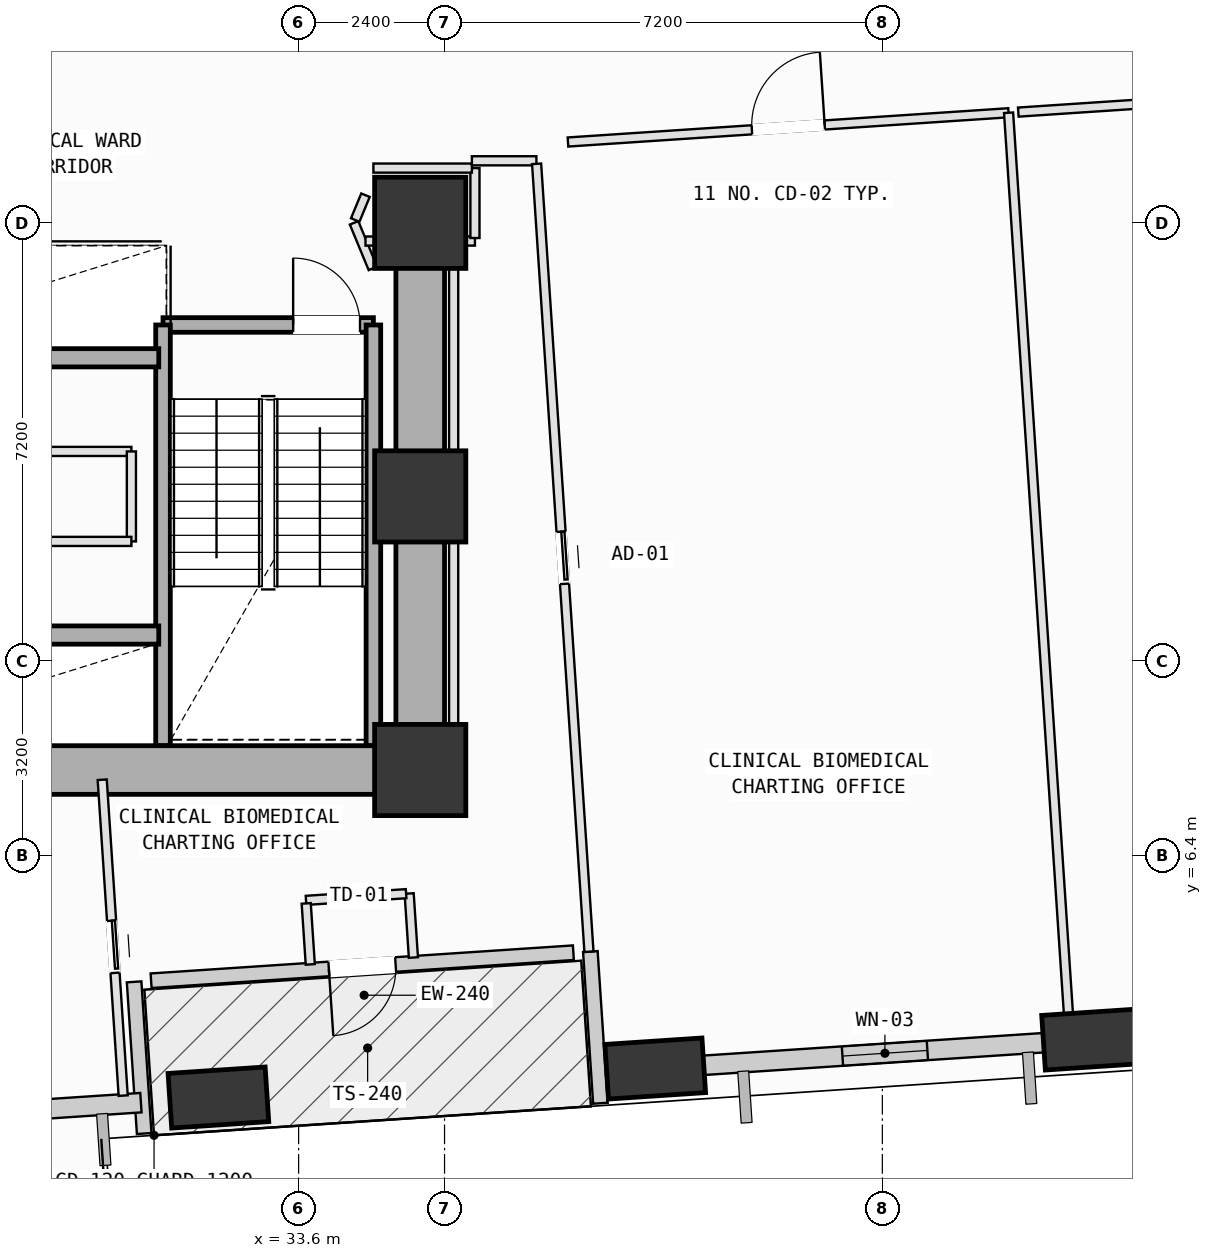
"""IFC4 building model, lengths in metres.
Left out: names, types, materials, properties, quantities, classifications, styles, units other than length and angle.
Written with IfcOpenShell. Run it as: python <this file> out.ifc"""

import sys

from ifc_helpers import new_model, si_unit, direction, frame, frame_2d, origin, origin_2d, place, context, subcontext, project, spatial, rectangle, extrude, element, fill, save


model = new_model("IFC4")
c1 = context("Model", 3, precision=1e-05, world=origin(), true_north=direction((0.0, 1.0)))
c2 = subcontext(c1, "Body", "Model", "MODEL_VIEW")
j1 = project(units=[si_unit("LENGTHUNIT", "METRE"), si_unit("PLANEANGLEUNIT", "RADIAN")], contexts=[c1])
p1 = place(None, origin())
s1 = spatial("IfcSite", under=j1, at=p1, CompositionType="ELEMENT")
p2 = place(p1, origin())
s2 = spatial("IfcBuilding", under=s1, at=p2, CompositionType="ELEMENT")
p3 = place(p2, frame((0.0, 0.0, 39.0)))
s3 = spatial("IfcBuildingStorey", under=s2, at=p3, CompositionType="ELEMENT", Elevation=39.0)
for number, where, z_axis, x_axis in (
    (1, (35.6, 7.8, 0.0), (0.0, 0.0, 1.0), (1.0, 0.0, 0.0)),
    (2, (35.6, 12.3, 0.0), (0.0, 0.0, 1.0), (1.0, 0.0, 0.0)),
    (3, (35.6, 16.8, 0.0), (0.0, 0.0, 1.0), (1.0, 0.0, 0.0)),
):
    element("IfcColumn", number, at=place(p3, frame(where, z_axis=z_axis, x_axis=x_axis)), inside=s3, PredefinedType="COLUMN", context=c2, shape_type="SweptSolid", body=[
        extrude(rectangle(XDim=1.5, YDim=1.5, at=origin_2d()), origin(), (0.0, 0.0, 1.0), 4.0),
    ])
p4 = place(p3, frame((32.281, 2.413, 0.002), z_axis=(0.092393758049, -0.004683554555, 0.995711533422), x_axis=(-0.015390128493, 0.999862767014, 0.006131156887)))
e4 = element("IfcColumn", 4, at=p4, inside=s3, PredefinedType="COLUMN", context=c2, shape_type="SweptSolid", body=[
    extrude(rectangle(XDim=1.6, YDim=0.9, at=origin_2d()), origin(), (0.0, 0.0, 1.0), 4.014),
])
p5 = place(p3, frame((39.465, 2.891, 0.002), z_axis=(0.090195018347, 0.024935912018, 0.995611901776), x_axis=(-0.329481938967, 0.944141509201, 0.006201814094)))
e5 = element("IfcColumn", 5, at=p5, inside=s3, PredefinedType="COLUMN", context=c2, shape_type="SweptSolid", body=[
    extrude(rectangle(XDim=1.6, YDim=0.9, at=origin_2d()), origin(), (0.0, 0.0, 1.0), 4.014),
])
p6 = place(p3, frame((46.649, 3.368, 0.002), z_axis=(0.087918926178, 0.054561987359, 0.994632219444), x_axis=(-0.582154202885, 0.813049480392, 0.006857586938)))
e6 = element("IfcColumn", 6, at=p6, inside=s3, PredefinedType="COLUMN", context=c2, shape_type="SweptSolid", body=[
    extrude(rectangle(XDim=1.6, YDim=0.9, at=origin_2d()), origin(), (0.0, 0.0, 1.0), 4.018),
])
p7 = place(p3, frame((38.119, 4.795, 0.0), z_axis=(0.0, 0.0, 1.0), x_axis=(-0.997802198498, -0.066262905711, 0.0)))
e7 = element("IfcWall", 7, at=p7, inside=s3, PredefinedType="SOLIDWALL", context=c2, shape_type="SweptSolid", body=[
    extrude(rectangle(XDim=6.96, YDim=0.24, at=frame_2d((3.48, 0.0))), origin(), (0.0, 0.0, 1.0), 3.165),
])
p8 = place(p7, frame((2.93, 0.0, 0.0)))
e8 = element("IfcOpeningElement", 8, at=p8, cuts=e7, PredefinedType="OPENING", context=c2, shape_type="SweptSolid", body=[
    extrude(rectangle(XDim=1.1, YDim=2.15, at=frame_2d((0.55, 1.075))), frame((0.0, 0.13, 0.0), z_axis=(0.0, -1.0, 0.0), x_axis=(1.0, 0.0, 0.0)), (0.0, 0.0, 1.0), 0.26),
])
p9 = place(p3, frame((30.895, 4.316, 0.0), z_axis=(0.0, 0.0, 1.0), x_axis=(0.066311588215, -0.997798964355, 0.0)))
e9 = element("IfcWall", 9, at=p9, inside=s3, PredefinedType="SOLIDWALL", context=c2, shape_type="SweptSolid", body=[
    extrude(rectangle(XDim=2.5, YDim=0.24, at=frame_2d((1.25, 0.0))), origin(), (0.0, 0.0, 1.0), 3.165),
])
p10 = place(p3, frame((38.564, 2.32, 0.0), z_axis=(0.0, 0.0, 1.0), x_axis=(-0.066214356047, 0.997805421439, 0.0)))
e10 = element("IfcWall", 10, at=p10, inside=s3, PredefinedType="SOLIDWALL", context=c2, shape_type="SweptSolid", body=[
    extrude(rectangle(XDim=2.5, YDim=0.24, at=frame_2d((1.25, 0.0))), origin(), (0.0, 0.0, 1.0), 3.165),
])
p11 = place(p3, frame((31.007, 2.329, 0.0), z_axis=(0.0, 0.0, 1.0), x_axis=(-0.99780174443, -0.066269742805, 0.0)))
e11 = element("IfcWall", 11, at=p11, inside=s3, PredefinedType="SOLIDWALL", context=c2, shape_type="SweptSolid", body=[
    extrude(rectangle(XDim=5.135, YDim=0.32, at=frame_2d((2.568, 0.0))), origin(), (0.0, 0.0, 1.0), 3.165),
])
p12 = place(p11, frame((1.813, 0.0, 0.75)))
e12 = element("IfcOpeningElement", 12, at=p12, cuts=e11, PredefinedType="OPENING", context=c2, shape_type="SweptSolid", body=[
    extrude(rectangle(XDim=2.0, YDim=1.95, at=frame_2d((1.0, 0.975))), frame((0.0, 0.17, 0.0), z_axis=(0.0, -1.0, 0.0), x_axis=(1.0, 0.0, 0.0)), (0.0, 0.0, 1.0), 0.34),
])
p13 = place(p3, frame((46.234, 3.34, 0.0), z_axis=(0.0, 0.0, 1.0), x_axis=(-0.997800992152, -0.066281068641, 0.0)))
e13 = element("IfcWall", 13, at=p13, inside=s3, PredefinedType="SOLIDWALL", context=c2, shape_type="SweptSolid", body=[
    extrude(rectangle(XDim=5.993, YDim=0.32, at=frame_2d((2.997, 0.0))), origin(), (0.0, 0.0, 1.0), 3.145),
])
p14 = place(p13, frame((2.298, 0.0, 0.75)))
e14 = element("IfcOpeningElement", 14, at=p14, cuts=e13, PredefinedType="OPENING", context=c2, shape_type="SweptSolid", body=[
    extrude(rectangle(XDim=1.4, YDim=1.85, at=frame_2d((0.7, 0.925))), frame((0.0, 0.17, 0.0), z_axis=(0.0, -1.0, 0.0), x_axis=(1.0, 0.0, 0.0)), (0.0, 0.0, 1.0), 0.34),
])
p15 = place(p3, frame((31.37, 15.12, 0.0), z_axis=(0.0, 0.0, 1.0), x_axis=(1.0, 0.0, 0.0)))
e15 = element("IfcWall", 15, at=p15, inside=s3, PredefinedType="SOLIDWALL", context=c2, shape_type="SweptSolid", body=[
    extrude(rectangle(XDim=3.46, YDim=0.24, at=frame_2d((1.73, 0.0))), origin(), (0.0, 0.0, 1.0), 3.78),
])
p16 = place(p15, frame((2.14, 0.0, 0.0)))
e16 = element("IfcOpeningElement", 16, at=p16, cuts=e15, PredefinedType="OPENING", context=c2, shape_type="SweptSolid", body=[
    extrude(rectangle(XDim=1.1, YDim=2.15, at=frame_2d((0.55, 1.075))), frame((0.0, 0.13, 0.0), z_axis=(0.0, -1.0, 0.0), x_axis=(1.0, 0.0, 0.0)), (0.0, 0.0, 1.0), 0.26),
])
for number, where, z_axis, x_axis in (
    (17, (34.83, 15.12, 0.0), (0.0, 0.0, 1.0), (0.0, -1.0, 0.0)),
    (18, (31.37, 8.2, 0.0), (0.0, 0.0, 1.0), (0.0, 1.0, 0.0)),
):
    element("IfcWall", number, at=place(p3, frame(where, z_axis=z_axis, x_axis=x_axis)), inside=s3, PredefinedType="SOLIDWALL", context=c2, shape_type="SweptSolid", body=[
        extrude(rectangle(XDim=6.92, YDim=0.24, at=frame_2d((3.46, 0.0))), origin(), (0.0, 0.0, 1.0), 3.78),
    ])
p17 = place(p3, frame((24.8, 7.8, 0.0), z_axis=(0.0, 0.0, 1.0), x_axis=(1.0, 0.0, 0.0)))
e19 = element("IfcWall", 19, at=p17, inside=s3, PredefinedType="SHEAR", context=c2, shape_type="SweptSolid", body=[
    extrude(rectangle(XDim=10.8, YDim=0.8, at=frame_2d((5.4, 0.0))), origin(), (0.0, 0.0, 1.0), 3.78),
])
p18 = place(p3, frame((35.6, 7.8, 0.0), z_axis=(0.0, 0.0, 1.0), x_axis=(0.0, 1.0, 0.0)))
e20 = element("IfcWall", 20, at=p18, inside=s3, PredefinedType="SHEAR", context=c2, shape_type="SweptSolid", body=[
    extrude(rectangle(XDim=9.0, YDim=0.8, at=frame_2d((4.5, 0.0))), origin(), (0.0, 0.0, 1.0), 3.78),
])
p19 = place(p3, frame((25.85, 10.02, 0.0), z_axis=(0.0, 0.0, 1.0), x_axis=(1.0, 0.0, 0.0)))
e21 = element("IfcWall", 21, at=p19, inside=s3, PredefinedType="SOLIDWALL", context=c2, shape_type="SweptSolid", body=[
    extrude(rectangle(XDim=5.45, YDim=0.3, at=frame_2d((2.725, 0.0))), origin(), (0.0, 0.0, 1.0), 3.78),
])
p20 = place(p19, frame((0.34, 0.0, 0.0)))
e22 = element("IfcOpeningElement", 22, at=p20, cuts=e21, PredefinedType="OPENING", context=c2, shape_type="SweptSolid", body=[
    extrude(rectangle(XDim=1.12, YDim=2.15, at=frame_2d((0.56, 1.075))), frame((0.0, 0.16, 0.0), z_axis=(0.0, -1.0, 0.0), x_axis=(1.0, 0.0, 0.0)), (0.0, 0.0, 1.0), 0.32),
])
p21 = place(p19, frame((2.24, 0.0, 0.0)))
e23 = element("IfcOpeningElement", 23, at=p21, cuts=e21, PredefinedType="OPENING", context=c2, shape_type="SweptSolid", body=[
    extrude(rectangle(XDim=1.12, YDim=2.15, at=frame_2d((0.56, 1.075))), frame((0.0, 0.16, 0.0), z_axis=(0.0, -1.0, 0.0), x_axis=(1.0, 0.0, 0.0)), (0.0, 0.0, 1.0), 0.32),
])
p22 = place(p3, frame((25.85, 14.58, 0.0), z_axis=(0.0, 0.0, 1.0), x_axis=(1.0, 0.0, 0.0)))
e24 = element("IfcWall", 24, at=p22, inside=s3, PredefinedType="SOLIDWALL", context=c2, shape_type="SweptSolid", body=[
    extrude(rectangle(XDim=5.45, YDim=0.3, at=frame_2d((2.725, 0.0))), origin(), (0.0, 0.0, 1.0), 3.78),
])
p23 = place(p3, frame((26.45, 13.04, 0.0), z_axis=(0.0, 0.0, 1.0), x_axis=(1.0, 0.0, 0.0)))
e25 = element("IfcWall", 25, at=p23, inside=s3, PredefinedType="PARTITIONING", context=c2, shape_type="SweptSolid", body=[
    extrude(rectangle(XDim=4.4, YDim=0.15, at=frame_2d((2.2, 0.0))), origin(), (0.0, 0.0, 1.0), 3.78),
])
p24 = place(p23, frame((1.74, 0.0, 0.0)))
e26 = element("IfcOpeningElement", 26, at=p24, cuts=e25, PredefinedType="OPENING", context=c2, shape_type="SweptSolid", body=[
    extrude(rectangle(XDim=0.92, YDim=2.1, at=frame_2d((0.46, 1.05))), frame((0.0, 0.085, 0.0), z_axis=(0.0, -1.0, 0.0), x_axis=(1.0, 0.0, 0.0)), (0.0, 0.0, 1.0), 0.17),
])
p25 = place(p3, frame((30.85, 13.04, 0.0), z_axis=(0.0, 0.0, 1.0), x_axis=(0.0, -1.0, 0.0)))
e27 = element("IfcWall", 27, at=p25, inside=s3, PredefinedType="PARTITIONING", context=c2, shape_type="SweptSolid", body=[
    extrude(rectangle(XDim=1.48, YDim=0.15, at=frame_2d((0.74, 0.0))), origin(), (0.0, 0.0, 1.0), 3.78),
])
p26 = place(p3, frame((30.85, 11.56, 0.0), z_axis=(0.0, 0.0, 1.0), x_axis=(-1.0, 0.0, 0.0)))
e28 = element("IfcWall", 28, at=p26, inside=s3, PredefinedType="PARTITIONING", context=c2, shape_type="SweptSolid", body=[
    extrude(rectangle(XDim=4.4, YDim=0.15, at=frame_2d((2.2, 0.0))), origin(), (0.0, 0.0, 1.0), 3.78),
])
p27 = place(p3, frame((30.37, 7.64, 0.0), z_axis=(0.0, 0.0, 1.0), x_axis=(0.066260678422, -0.997802346407, 0.0)))
e29 = element("IfcWall", 29, at=p27, inside=s3, PredefinedType="PARTITIONING", context=c2, shape_type="SweptSolid", body=[
    extrude(rectangle(XDim=5.206, YDim=0.15, at=frame_2d((2.603, 0.0))), origin(), (0.0, 0.0, 1.0), 3.78),
])
p28 = place(p27, frame((2.324, 0.0, 0.0)))
e30 = element("IfcOpeningElement", 30, at=p28, cuts=e29, PredefinedType="OPENING", context=c2, shape_type="SweptSolid", body=[
    extrude(rectangle(XDim=0.86, YDim=2.06, at=frame_2d((0.43, 1.03))), frame((0.0, 0.085, 0.0), z_axis=(0.0, -1.0, 0.0), x_axis=(1.0, 0.0, 0.0)), (0.0, 0.0, 1.0), 0.17),
])
p29 = place(p3, frame((36.15, 7.5, 0.0), z_axis=(0.0, 0.0, 1.0), x_axis=(0.0, 1.0, 0.0)))
e31 = element("IfcWall", 31, at=p29, inside=s3, PredefinedType="PARTITIONING", context=c2, shape_type="SweptSolid", body=[
    extrude(rectangle(XDim=8.84, YDim=0.15, at=frame_2d((4.42, 0.0))), origin(), (0.0, 0.0, 1.0), 3.78),
])
p30 = place(p3, frame((34.822, 16.05, 0.0), z_axis=(0.0, 0.0, 1.0), x_axis=(-0.382050639738, 0.924141389981, 0.0)))
e32 = element("IfcWall", 32, at=p30, inside=s3, PredefinedType="PARTITIONING", context=c2, shape_type="SweptSolid", body=[
    extrude(rectangle(XDim=0.812, YDim=0.15, at=frame_2d((0.406, 0.0))), origin(), (0.0, 0.0, 1.0), 3.78),
])
p31 = place(p3, frame((34.531, 16.846, 0.0), z_axis=(0.0, 0.0, 1.0), x_axis=(0.382612233621, 0.923909020782, 0.0)))
e33 = element("IfcWall", 33, at=p31, inside=s3, PredefinedType="PARTITIONING", context=c2, shape_type="SweptSolid", body=[
    extrude(rectangle(XDim=0.442, YDim=0.15, at=frame_2d((0.221, 0.0))), origin(), (0.0, 0.0, 1.0), 3.78),
])
p32 = place(p3, frame((34.7, 16.5, 0.0), z_axis=(0.0, 0.0, 1.0), x_axis=(1.0, 0.0, 0.0)))
e34 = element("IfcWall", 34, at=p32, inside=s3, PredefinedType="PARTITIONING", context=c2, shape_type="SweptSolid", body=[
    extrude(rectangle(XDim=0.525, YDim=0.15, at=frame_2d((0.263, 0.0))), origin(), (0.0, 0.0, 1.0), 2.865),
])
p33 = place(p3, frame((35.975, 16.5, 0.0), z_axis=(0.0, 0.0, 1.0), x_axis=(1.0, 0.0, 0.0)))
e35 = element("IfcWall", 35, at=p33, inside=s3, PredefinedType="PARTITIONING", context=c2, shape_type="SweptSolid", body=[
    extrude(rectangle(XDim=0.525, YDim=0.15, at=frame_2d((0.262, 0.0))), origin(), (0.0, 0.0, 1.0), 3.78),
])
p34 = place(p3, frame((36.5, 16.55, 0.0), z_axis=(0.0, 0.0, 1.0), x_axis=(0.0, 1.0, 0.0)))
e36 = element("IfcWall", 36, at=p34, inside=s3, PredefinedType="PARTITIONING", context=c2, shape_type="SweptSolid", body=[
    extrude(rectangle(XDim=1.15, YDim=0.15, at=frame_2d((0.575, 0.0))), origin(), (0.0, 0.0, 1.0), 3.78),
])
p35 = place(p3, frame((36.45, 17.7, 0.0), z_axis=(0.0, 0.0, 1.0), x_axis=(-1.0, 0.0, 0.0)))
e37 = element("IfcWall", 37, at=p35, inside=s3, PredefinedType="PARTITIONING", context=c2, shape_type="SweptSolid", body=[
    extrude(rectangle(XDim=1.62, YDim=0.15, at=frame_2d((0.81, 0.0))), origin(), (0.0, 0.0, 1.0), 3.78),
])
p36 = place(p3, frame((36.45, 17.82, 0.0), z_axis=(0.0, 0.0, 1.0), x_axis=(1.0, 0.0, 0.0)))
e38 = element("IfcWall", 38, at=p36, inside=s3, PredefinedType="PARTITIONING", context=c2, shape_type="SweptSolid", body=[
    extrude(rectangle(XDim=1.061, YDim=0.15, at=frame_2d((0.531, 0.0))), origin(), (0.0, 0.0, 1.0), 3.78),
])
p37 = place(p3, frame((37.514, 17.77, 0.0), z_axis=(0.0, 0.0, 1.0), x_axis=(0.066305643617, -0.997799359403, 0.0)))
e39 = element("IfcWall", 39, at=p37, inside=s3, PredefinedType="PARTITIONING", context=c2, shape_type="SweptSolid", body=[
    extrude(rectangle(XDim=12.987, YDim=0.15, at=frame_2d((6.493, 0.0))), origin(), (0.0, 0.0, 1.0), 3.78),
])
p38 = place(p37, frame((6.063, 0.0, 0.0)))
e40 = element("IfcOpeningElement", 40, at=p38, cuts=e39, PredefinedType="OPENING", context=c2, shape_type="SweptSolid", body=[
    extrude(rectangle(XDim=0.86, YDim=2.06, at=frame_2d((0.43, 1.03))), frame((0.0, 0.085, 0.0), z_axis=(0.0, -1.0, 0.0), x_axis=(1.0, 0.0, 0.0)), (0.0, 0.0, 1.0), 0.17),
])
p39 = place(p3, frame((35.488, 4.716, 0.0), z_axis=(0.0, 0.0, 1.0), x_axis=(-0.066396171677, 0.997793339518, 0.0)))
e41 = element("IfcWall", 41, at=p39, inside=s3, PredefinedType="PARTITIONING", context=c2, shape_type="SweptSolid", body=[
    extrude(rectangle(XDim=1.055, YDim=0.15, at=frame_2d((0.528, 0.0))), origin(), (0.0, 0.0, 1.0), 3.78),
])
p40 = place(p3, frame((35.368, 5.766, 0.0), z_axis=(0.0, 0.0, 1.0), x_axis=(-0.997770071027, -0.066744927623, 0.0)))
e42 = element("IfcWall", 42, at=p40, inside=s3, PredefinedType="PARTITIONING", context=c2, shape_type="SweptSolid", body=[
    extrude(rectangle(XDim=1.65, YDim=0.15, at=frame_2d((0.825, 0.0))), origin(), (0.0, 0.0, 1.0), 3.78),
])
p41 = place(p3, frame((33.725, 5.606, 0.0), z_axis=(0.0, 0.0, 1.0), x_axis=(0.06655125223, -0.997783007886, 0.0)))
e43 = element("IfcWall", 43, at=p41, inside=s3, PredefinedType="PARTITIONING", context=c2, shape_type="SweptSolid", body=[
    extrude(rectangle(XDim=1.005, YDim=0.15, at=frame_2d((0.502, 0.0))), origin(), (0.0, 0.0, 1.0), 3.78),
])
p42 = place(p3, frame((38.03, 18.129, 0.0), z_axis=(0.0, 0.0, 1.0), x_axis=(0.997802084091, 0.066264628449, 0.0)))
e44 = element("IfcWall", 44, at=p42, inside=s3, PredefinedType="PARTITIONING", context=c2, shape_type="SweptSolid", body=[
    extrude(rectangle(XDim=7.262, YDim=0.15, at=frame_2d((3.631, 0.0))), origin(), (0.0, 0.0, 1.0), 3.78),
])
p43 = place(p42, frame((3.031, 0.0, 0.0)))
e45 = element("IfcOpeningElement", 45, at=p43, cuts=e44, PredefinedType="OPENING", context=c2, shape_type="SweptSolid", body=[
    extrude(rectangle(XDim=1.2, YDim=2.15, at=frame_2d((0.6, 1.075))), frame((0.0, 0.085, 0.0), z_axis=(0.0, -1.0, 0.0), x_axis=(1.0, 0.0, 0.0)), (0.0, 0.0, 1.0), 0.17),
])
p44 = place(p3, frame((45.276, 18.61, 0.0), z_axis=(0.0, 0.0, 1.0), x_axis=(0.066289466221, -0.997800434289, 0.0)))
e46 = element("IfcWall", 46, at=p44, inside=s3, PredefinedType="PARTITIONING", context=c2, shape_type="SweptSolid", body=[
    extrude(rectangle(XDim=15.177, YDim=0.15, at=frame_2d((7.589, 0.0))), origin(), (0.0, 0.0, 1.0), 3.78),
])
p45 = place(p3, frame((40.269, 2.713, 0.0), z_axis=(0.0, 0.0, 1.0), x_axis=(-0.997819659063, -0.065999454453, 0.0)))
e47 = element("IfcWall", 47, at=p45, inside=s3, PredefinedType="PARTITIONING", context=c2, shape_type="SweptSolid", body=[
    extrude(rectangle(XDim=1.591, YDim=0.15, at=frame_2d((0.795, 0.0))), origin(), (0.0, 0.0, 1.0), 3.145),
])
p46 = place(p3, frame((45.436, 18.621, 0.0), z_axis=(0.0, 0.0, 1.0), x_axis=(0.997805472688, 0.066213583763, 0.0)))
e48 = element("IfcWall", 48, at=p46, inside=s3, PredefinedType="PARTITIONING", context=c2, shape_type="SweptSolid", body=[
    extrude(rectangle(XDim=7.64, YDim=0.15, at=frame_2d((3.82, 0.0))), origin(), (0.0, 0.0, 1.0), 3.78),
])
p47 = place(p46, frame((3.22, 0.0, 0.0)))
e49 = element("IfcOpeningElement", 49, at=p47, cuts=e48, PredefinedType="OPENING", context=c2, shape_type="SweptSolid", body=[
    extrude(rectangle(XDim=1.2, YDim=2.15, at=frame_2d((0.6, 1.075))), frame((0.0, 0.085, 0.0), z_axis=(0.0, -1.0, 0.0), x_axis=(1.0, 0.0, 0.0)), (0.0, 0.0, 1.0), 0.17),
])
p48 = place(p3, frame((47.446, 3.19, 0.0), z_axis=(0.0, 0.0, 1.0), x_axis=(-0.997815818471, -0.066057493209, 0.0)))
e50 = element("IfcWall", 50, at=p48, inside=s3, PredefinedType="PARTITIONING", context=c2, shape_type="SweptSolid", body=[
    extrude(rectangle(XDim=0.983, YDim=0.15, at=frame_2d((0.492, 0.0))), origin(), (0.0, 0.0, 1.0), 3.145),
])
p49 = place(p8, origin())
e51 = element("IfcDoor", 51, at=p49, inside=s3, OperationType="SINGLE_SWING_RIGHT", PredefinedType="DOOR", context=c2, shape_type="SweptSolid", body=[
    extrude(rectangle(XDim=1.1, YDim=2.15, at=frame_2d((0.55, 1.075))), frame((0.0, 0.025, 0.0), z_axis=(0.0, -1.0, 0.0), x_axis=(1.0, 0.0, 0.0)), (0.0, 0.0, 1.0), 0.05),
])
fill(e8, e51)
p50 = place(p14, origin())
e52 = element("IfcWindow", 52, at=p50, inside=s3, PartitioningType="SINGLE_PANEL", PredefinedType="WINDOW", context=c2, shape_type="SweptSolid", body=[
    extrude(rectangle(XDim=1.4, YDim=1.85, at=frame_2d((0.7, 0.925))), frame((0.0, 0.03, 0.0), z_axis=(0.0, -1.0, 0.0), x_axis=(1.0, 0.0, 0.0)), (0.0, 0.0, 1.0), 0.06),
])
fill(e14, e52)
p51 = place(p16, origin())
e53 = element("IfcDoor", 53, at=p51, inside=s3, OperationType="SINGLE_SWING_LEFT", PredefinedType="DOOR", context=c2, shape_type="SweptSolid", body=[
    extrude(rectangle(XDim=1.1, YDim=2.15, at=frame_2d((0.55, 1.075))), frame((0.0, 0.025, 0.0), z_axis=(0.0, -1.0, 0.0), x_axis=(1.0, 0.0, 0.0)), (0.0, 0.0, 1.0), 0.05),
])
fill(e16, e53)
p52 = place(p43, origin())
e54 = element("IfcDoor", 54, at=p52, inside=s3, OperationType="SINGLE_SWING_RIGHT", PredefinedType="DOOR", context=c2, shape_type="SweptSolid", body=[
    extrude(rectangle(XDim=1.2, YDim=2.15, at=frame_2d((0.6, 1.075))), frame((0.0, 0.025, 0.0), z_axis=(0.0, -1.0, 0.0), x_axis=(1.0, 0.0, 0.0)), (0.0, 0.0, 1.0), 0.05),
])
fill(e45, e54)
p53 = place(p38, origin())
e55 = element("IfcDoor", 55, at=p53, inside=s3, OperationType="SLIDING_TO_LEFT", PredefinedType="DOOR", context=c2, shape_type="SweptSolid", body=[
    extrude(rectangle(XDim=0.86, YDim=2.06, at=frame_2d((0.43, 1.03))), frame((0.0, 0.025, 0.0), z_axis=(0.0, -1.0, 0.0), x_axis=(1.0, 0.0, 0.0)), (0.0, 0.0, 1.0), 0.05),
])
fill(e40, e55)
p54 = place(p28, origin())
e56 = element("IfcDoor", 56, at=p54, inside=s3, OperationType="SLIDING_TO_LEFT", PredefinedType="DOOR", context=c2, shape_type="SweptSolid", body=[
    extrude(rectangle(XDim=0.86, YDim=2.06, at=frame_2d((0.43, 1.03))), frame((0.0, 0.025, 0.0), z_axis=(0.0, -1.0, 0.0), x_axis=(1.0, 0.0, 0.0)), (0.0, 0.0, 1.0), 0.05),
])
fill(e30, e56)
save(model, sys.argv[1])
